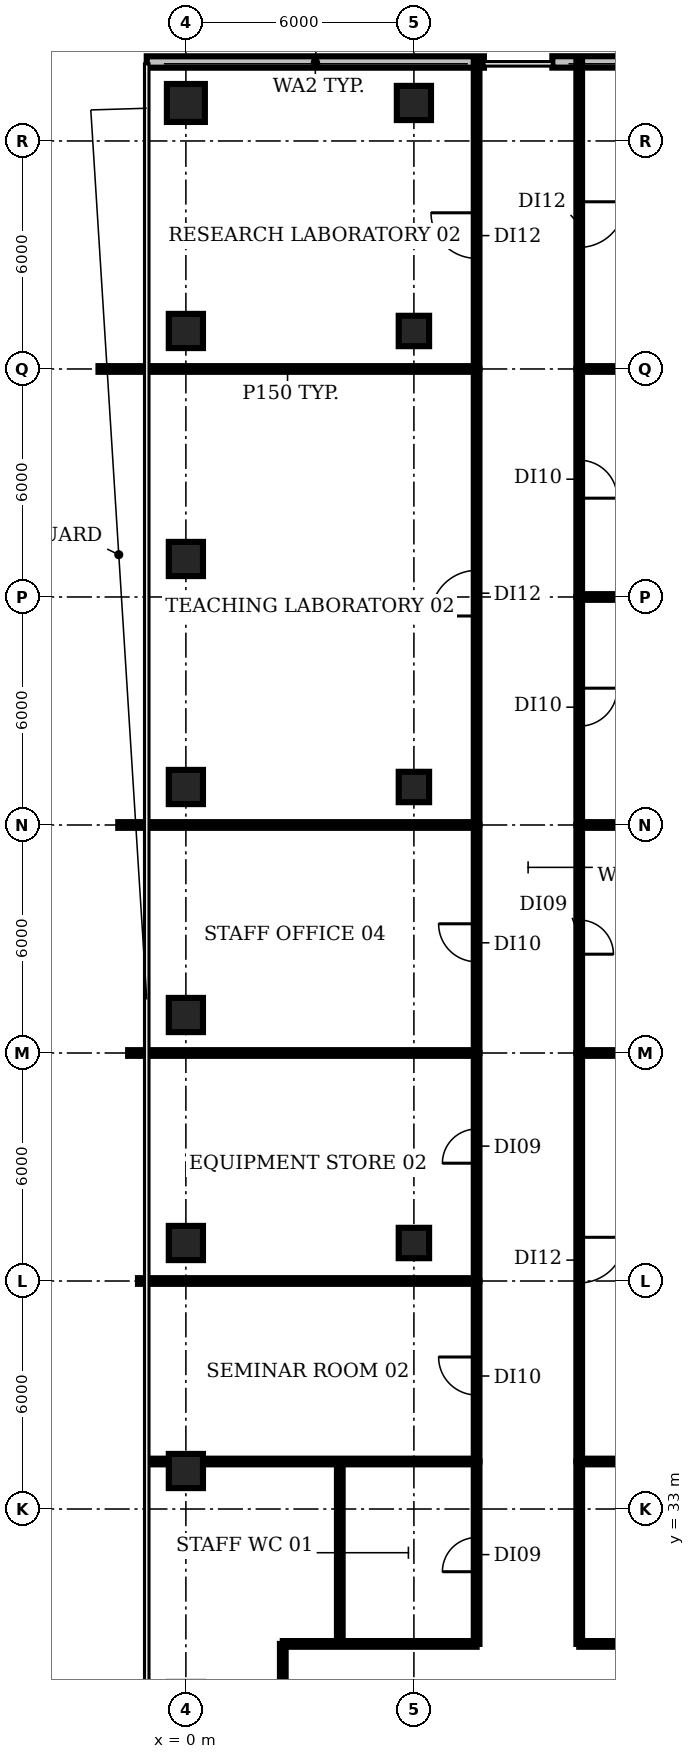
"""IFC4 building model, lengths in metres.
Left out: names, types, materials, properties, quantities, classifications, styles, units other than length and angle.
Written with IfcOpenShell. Run it as: python <this file> out.ifc"""

import sys

from ifc_helpers import new_model, si_unit, direction, frame, frame_2d, origin, origin_2d, place, context, subcontext, project, spatial, rectangle, circle, extrude, element, fill, save


model = new_model("IFC4")
c1 = context("Model", 3, precision=1e-05, world=origin(), true_north=direction((0.0, 1.0)))
c2 = subcontext(c1, "Body", "Model", "MODEL_VIEW")
j1 = project(units=[si_unit("LENGTHUNIT", "METRE"), si_unit("PLANEANGLEUNIT", "RADIAN")], contexts=[c1])
p1 = place(None, origin())
s1 = spatial("IfcSite", under=j1, at=p1, CompositionType="ELEMENT")
p2 = place(p1, origin())
s2 = spatial("IfcBuilding", under=s1, at=p2, CompositionType="ELEMENT")
p3 = place(p2, frame((0.0, 0.0, 100.4)))
s3 = spatial("IfcBuildingStorey", under=s2, at=p3, CompositionType="ELEMENT", Elevation=100.4)
for number, where, z_axis, x_axis in (
    (1, (0.0, 34.0, 0.0), (0.0, 0.0, 1.0), (1.0, 0.0, 0.0)),
    (2, (0.0, 40.0, 0.0), (0.0, 0.0, 1.0), (1.0, 0.0, 0.0)),
    (3, (0.0, 46.0, 0.0), (0.0, 0.0, 1.0), (1.0, 0.0, 0.0)),
    (4, (0.0, 52.0, 0.0), (0.0, 0.0, 1.0), (1.0, 0.0, 0.0)),
    (5, (0.0, 58.0, 0.0), (0.0, 0.0, 1.0), (1.0, 0.0, 0.0)),
    (6, (0.0, 64.0, 0.0), (0.0, 0.0, 1.0), (1.0, 0.0, 0.0)),
):
    element("IfcColumn", number, at=place(p3, frame(where, z_axis=z_axis, x_axis=x_axis)), inside=s3, PredefinedType="COLUMN", context=c2, shape_type="SweptSolid", body=[
        extrude(rectangle(XDim=0.9, YDim=0.9, at=origin_2d()), origin(), (0.0, 0.0, 1.0), 3.85),
    ])
p4 = place(p3, frame((0.0, 70.0, 0.0), z_axis=(0.0, 0.0, 1.0), x_axis=(1.0, 0.0, 0.0)))
e7 = element("IfcColumn", 7, at=p4, inside=s3, PredefinedType="COLUMN", context=c2, shape_type="SweptSolid", body=[
    extrude(circle(Radius=0.5, at=origin_2d()), origin(), (0.0, 0.0, 1.0), 3.85),
])
for number, where, z_axis, x_axis in (
    (8, (6.0, 40.0, 0.0), (0.0, 0.0, 1.0), (1.0, 0.0, 0.0)),
    (9, (6.0, 52.0, 0.0), (0.0, 0.0, 1.0), (1.0, 0.0, 0.0)),
    (10, (6.0, 64.0, 0.0), (0.0, 0.0, 1.0), (1.0, 0.0, 0.0)),
):
    element("IfcColumn", number, at=place(p3, frame(where, z_axis=z_axis, x_axis=x_axis)), inside=s3, PredefinedType="COLUMN", context=c2, shape_type="SweptSolid", body=[
        extrude(rectangle(XDim=0.8, YDim=0.8, at=origin_2d()), origin(), (0.0, 0.0, 1.0), 3.85),
    ])
p5 = place(p3, frame((6.0, 70.0, 0.0), z_axis=(0.0, 0.0, 1.0), x_axis=(1.0, 0.0, 0.0)))
e11 = element("IfcColumn", 11, at=p5, inside=s3, PredefinedType="COLUMN", context=c2, shape_type="SweptSolid", body=[
    extrude(rectangle(XDim=0.9, YDim=0.9, at=origin_2d()), origin(), (0.0, 0.0, 1.0), 3.85),
])
p6 = place(p3, frame((14.357, 71.08, 0.0), z_axis=(0.0, 0.0, 1.0), x_axis=(-1.0, 0.0, 0.0)))
e12 = element("IfcWall", 12, at=p6, inside=s3, PredefinedType="SOLIDWALL", context=c2, shape_type="SweptSolid", body=[
    extrude(rectangle(XDim=4.715, YDim=0.3, at=frame_2d((2.357, 0.0))), origin(), (0.0, 0.0, 1.0), 3.85),
])
p7 = place(p3, frame((7.843, 71.078, 0.0), z_axis=(0.0, 0.0, 1.0), x_axis=(-1.0, 0.0, 0.0)))
e13 = element("IfcWall", 13, at=p7, inside=s3, PredefinedType="SOLIDWALL", context=c2, shape_type="SweptSolid", body=[
    extrude(rectangle(XDim=8.873, YDim=0.3, at=frame_2d((4.436, 0.0))), origin(), (0.0, 0.0, 1.0), 3.85),
])
p8 = place(p3, frame((-2.3, 63.0, 0.0), z_axis=(0.0, 0.0, 1.0), x_axis=(1.0, 0.0, 0.0)))
e14 = element("IfcWall", 14, at=p8, inside=s3, PredefinedType="PARTITIONING", context=c2, shape_type="SweptSolid", body=[
    extrude(rectangle(XDim=9.95, YDim=0.15, at=frame_2d((4.975, 0.0))), origin(), (0.0, 0.0, 1.0), 2.83),
])
p9 = place(p3, frame((-1.78, 51.0, 0.0), z_axis=(0.0, 0.0, 1.0), x_axis=(1.0, 0.0, 0.0)))
e15 = element("IfcWall", 15, at=p9, inside=s3, PredefinedType="PARTITIONING", context=c2, shape_type="SweptSolid", body=[
    extrude(rectangle(XDim=9.43, YDim=0.15, at=frame_2d((4.715, 0.0))), origin(), (0.0, 0.0, 1.0), 2.83),
])
p10 = place(p3, frame((-1.52, 45.0, 0.0), z_axis=(0.0, 0.0, 1.0), x_axis=(1.0, 0.0, 0.0)))
e16 = element("IfcWall", 16, at=p10, inside=s3, PredefinedType="PARTITIONING", context=c2, shape_type="SweptSolid", body=[
    extrude(rectangle(XDim=9.17, YDim=0.15, at=frame_2d((4.585, 0.0))), origin(), (0.0, 0.0, 1.0), 2.83),
])
p11 = place(p3, frame((-1.26, 39.0, 0.0), z_axis=(0.0, 0.0, 1.0), x_axis=(1.0, 0.0, 0.0)))
e17 = element("IfcWall", 17, at=p11, inside=s3, PredefinedType="PARTITIONING", context=c2, shape_type="SweptSolid", body=[
    extrude(rectangle(XDim=8.91, YDim=0.15, at=frame_2d((4.455, 0.0))), origin(), (0.0, 0.0, 1.0), 2.83),
])
p12 = place(p3, frame((-0.965, 34.25, 0.0), z_axis=(0.0, 0.0, 1.0), x_axis=(1.0, 0.0, 0.0)))
e18 = element("IfcWall", 18, at=p12, inside=s3, PredefinedType="PARTITIONING", context=c2, shape_type="SweptSolid", body=[
    extrude(rectangle(XDim=8.615, YDim=0.15, at=frame_2d((4.308, 0.0))), origin(), (0.0, 0.0, 1.0), 2.83),
])
p13 = place(p3, frame((2.55, 25.55, 0.0), z_axis=(0.0, 0.0, 1.0), x_axis=(0.0, 1.0, 0.0)))
e19 = element("IfcWall", 19, at=p13, inside=s3, PredefinedType="PARTITIONING", context=c2, shape_type="SweptSolid", body=[
    extrude(rectangle(XDim=3.9, YDim=0.15, at=frame_2d((1.95, 0.0))), origin(), (0.0, 0.0, 1.0), 2.83),
])
p14 = place(p3, frame((2.55, 29.45, 0.0), z_axis=(0.0, 0.0, 1.0), x_axis=(1.0, 0.0, 0.0)))
e20 = element("IfcWall", 20, at=p14, inside=s3, PredefinedType="PARTITIONING", context=c2, shape_type="SweptSolid", body=[
    extrude(rectangle(XDim=5.1, YDim=0.15, at=frame_2d((2.55, 0.0))), origin(), (0.0, 0.0, 1.0), 2.83),
])
p15 = place(p3, frame((4.05, 29.45, 0.0), z_axis=(0.0, 0.0, 1.0), x_axis=(0.0, 1.0, 0.0)))
e21 = element("IfcWall", 21, at=p15, inside=s3, PredefinedType="PARTITIONING", context=c2, shape_type="SweptSolid", body=[
    extrude(rectangle(XDim=4.8, YDim=0.15, at=frame_2d((2.4, 0.0))), origin(), (0.0, 0.0, 1.0), 2.83),
])
p16 = place(p3, frame((7.65, 29.45, 0.0), z_axis=(0.0, 0.0, 1.0), x_axis=(0.0, 1.0, 0.0)))
e22 = element("IfcWall", 22, at=p16, inside=s3, PredefinedType="PARTITIONING", context=c2, shape_type="SweptSolid", body=[
    extrude(rectangle(XDim=4.8, YDim=0.15, at=frame_2d((2.4, 0.0))), origin(), (0.0, 0.0, 1.0), 2.83),
])
p17 = place(p16, frame((1.9, 0.0, 0.0)))
e23 = element("IfcOpeningElement", 23, at=p17, cuts=e22, PredefinedType="OPENING", context=c2, shape_type="SweptSolid", body=[
    extrude(rectangle(XDim=0.9, YDim=2.1, at=frame_2d((0.45, 1.05))), frame((0.0, 0.085, 0.0), z_axis=(0.0, -1.0, 0.0), x_axis=(1.0, 0.0, 0.0)), (0.0, 0.0, 1.0), 0.17),
])
p18 = place(p3, frame((7.65, 34.25, 0.0), z_axis=(0.0, 0.0, 1.0), x_axis=(0.0, 1.0, 0.0)))
e24 = element("IfcWall", 24, at=p18, inside=s3, PredefinedType="PARTITIONING", context=c2, shape_type="SweptSolid", body=[
    extrude(rectangle(XDim=4.75, YDim=0.15, at=frame_2d((2.375, 0.0))), origin(), (0.0, 0.0, 1.0), 2.83),
])
p19 = place(p18, frame((1.75, 0.0, 0.0)))
e25 = element("IfcOpeningElement", 25, at=p19, cuts=e24, PredefinedType="OPENING", context=c2, shape_type="SweptSolid", body=[
    extrude(rectangle(XDim=1.0, YDim=2.1, at=frame_2d((0.5, 1.05))), frame((0.0, 0.085, 0.0), z_axis=(0.0, -1.0, 0.0), x_axis=(1.0, 0.0, 0.0)), (0.0, 0.0, 1.0), 0.17),
])
p20 = place(p3, frame((7.65, 39.0, 0.0), z_axis=(0.0, 0.0, 1.0), x_axis=(0.0, 1.0, 0.0)))
e26 = element("IfcWall", 26, at=p20, inside=s3, PredefinedType="PARTITIONING", context=c2, shape_type="SweptSolid", body=[
    extrude(rectangle(XDim=6.0, YDim=0.15, at=frame_2d((3.0, 0.0))), origin(), (0.0, 0.0, 1.0), 2.83),
])
p21 = place(p20, frame((3.1, 0.0, 0.0)))
e27 = element("IfcOpeningElement", 27, at=p21, cuts=e26, PredefinedType="OPENING", context=c2, shape_type="SweptSolid", body=[
    extrude(rectangle(XDim=0.9, YDim=2.1, at=frame_2d((0.45, 1.05))), frame((0.0, 0.085, 0.0), z_axis=(0.0, -1.0, 0.0), x_axis=(1.0, 0.0, 0.0)), (0.0, 0.0, 1.0), 0.17),
])
p22 = place(p3, frame((7.65, 45.0, 0.0), z_axis=(0.0, 0.0, 1.0), x_axis=(0.0, 1.0, 0.0)))
e28 = element("IfcWall", 28, at=p22, inside=s3, PredefinedType="PARTITIONING", context=c2, shape_type="SweptSolid", body=[
    extrude(rectangle(XDim=6.0, YDim=0.15, at=frame_2d((3.0, 0.0))), origin(), (0.0, 0.0, 1.0), 2.83),
])
p23 = place(p22, frame((2.4, 0.0, 0.0)))
e29 = element("IfcOpeningElement", 29, at=p23, cuts=e28, PredefinedType="OPENING", context=c2, shape_type="SweptSolid", body=[
    extrude(rectangle(XDim=1.0, YDim=2.1, at=frame_2d((0.5, 1.05))), frame((0.0, 0.085, 0.0), z_axis=(0.0, -1.0, 0.0), x_axis=(1.0, 0.0, 0.0)), (0.0, 0.0, 1.0), 0.17),
])
p24 = place(p3, frame((7.65, 51.0, 0.0), z_axis=(0.0, 0.0, 1.0), x_axis=(0.0, 1.0, 0.0)))
e30 = element("IfcWall", 30, at=p24, inside=s3, PredefinedType="PARTITIONING", context=c2, shape_type="SweptSolid", body=[
    extrude(rectangle(XDim=12.0, YDim=0.15, at=frame_2d((6.0, 0.0))), origin(), (0.0, 0.0, 1.0), 2.83),
])
p25 = place(p24, frame((5.5, 0.0, 0.0)))
e31 = element("IfcOpeningElement", 31, at=p25, cuts=e30, PredefinedType="OPENING", context=c2, shape_type="SweptSolid", body=[
    extrude(rectangle(XDim=1.2, YDim=2.1, at=frame_2d((0.6, 1.05))), frame((0.0, 0.085, 0.0), z_axis=(0.0, -1.0, 0.0), x_axis=(1.0, 0.0, 0.0)), (0.0, 0.0, 1.0), 0.17),
])
p26 = place(p3, frame((7.65, 63.0, 0.0), z_axis=(0.0, 0.0, 1.0), x_axis=(0.0, 1.0, 0.0)))
e32 = element("IfcWall", 32, at=p26, inside=s3, PredefinedType="PARTITIONING", context=c2, shape_type="SweptSolid", body=[
    extrude(rectangle(XDim=8.09, YDim=0.15, at=frame_2d((4.045, 0.0))), origin(), (0.0, 0.0, 1.0), 2.83),
])
p27 = place(p26, frame((2.91, 0.0, 0.0)))
e33 = element("IfcOpeningElement", 33, at=p27, cuts=e32, PredefinedType="OPENING", context=c2, shape_type="SweptSolid", body=[
    extrude(rectangle(XDim=1.2, YDim=2.1, at=frame_2d((0.6, 1.05))), frame((0.0, 0.085, 0.0), z_axis=(0.0, -1.0, 0.0), x_axis=(1.0, 0.0, 0.0)), (0.0, 0.0, 1.0), 0.17),
])
p28 = place(p3, frame((10.35, 29.45, 0.0), z_axis=(0.0, 0.0, 1.0), x_axis=(0.0, 1.0, 0.0)))
e34 = element("IfcWall", 34, at=p28, inside=s3, PredefinedType="PARTITIONING", context=c2, shape_type="SweptSolid", body=[
    extrude(rectangle(XDim=4.8, YDim=0.15, at=frame_2d((2.4, 0.0))), origin(), (0.0, 0.0, 1.0), 2.83),
])
p29 = place(p3, frame((10.35, 29.45, 0.0), z_axis=(0.0, 0.0, 1.0), x_axis=(1.0, 0.0, 0.0)))
e35 = element("IfcWall", 35, at=p29, inside=s3, PredefinedType="PARTITIONING", context=c2, shape_type="SweptSolid", body=[
    extrude(rectangle(XDim=4.05, YDim=0.15, at=frame_2d((2.025, 0.0))), origin(), (0.0, 0.0, 1.0), 2.83),
])
p30 = place(p3, frame((10.35, 34.25, 0.0), z_axis=(0.0, 0.0, 1.0), x_axis=(1.0, 0.0, 0.0)))
e36 = element("IfcWall", 36, at=p30, inside=s3, PredefinedType="PARTITIONING", context=c2, shape_type="SweptSolid", body=[
    extrude(rectangle(XDim=14.85, YDim=0.15, at=frame_2d((7.425, 0.0))), origin(), (0.0, 0.0, 1.0), 2.83),
])
p31 = place(p3, frame((10.35, 45.0, 0.0), z_axis=(0.0, 0.0, 1.0), x_axis=(0.0, -1.0, 0.0)))
e37 = element("IfcWall", 37, at=p31, inside=s3, PredefinedType="PARTITIONING", context=c2, shape_type="SweptSolid", body=[
    extrude(rectangle(XDim=10.75, YDim=0.15, at=frame_2d((5.375, 0.0))), origin(), (0.0, 0.0, 1.0), 2.83),
])
p32 = place(p31, frame((4.85, 0.0, 0.0)))
e38 = element("IfcOpeningElement", 38, at=p32, cuts=e37, PredefinedType="OPENING", context=c2, shape_type="SweptSolid", body=[
    extrude(rectangle(XDim=1.2, YDim=2.1, at=frame_2d((0.6, 1.05))), frame((0.0, 0.085, 0.0), z_axis=(0.0, -1.0, 0.0), x_axis=(1.0, 0.0, 0.0)), (0.0, 0.0, 1.0), 0.17),
])
p33 = place(p3, frame((10.35, 45.0, 0.0), z_axis=(0.0, 0.0, 1.0), x_axis=(1.0, 0.0, 0.0)))
e39 = element("IfcWall", 39, at=p33, inside=s3, PredefinedType="PARTITIONING", context=c2, shape_type="SweptSolid", body=[
    extrude(rectangle(XDim=14.63, YDim=0.15, at=frame_2d((7.315, 0.0))), origin(), (0.0, 0.0, 1.0), 2.83),
])
p34 = place(p3, frame((10.35, 51.0, 0.0), z_axis=(0.0, 0.0, 1.0), x_axis=(0.0, -1.0, 0.0)))
e40 = element("IfcWall", 40, at=p34, inside=s3, PredefinedType="PARTITIONING", context=c2, shape_type="SweptSolid", body=[
    extrude(rectangle(XDim=6.0, YDim=0.15, at=frame_2d((3.0, 0.0))), origin(), (0.0, 0.0, 1.0), 2.83),
])
p35 = place(p34, frame((2.5, 0.0, 0.0)))
e41 = element("IfcOpeningElement", 41, at=p35, cuts=e40, PredefinedType="OPENING", context=c2, shape_type="SweptSolid", body=[
    extrude(rectangle(XDim=0.9, YDim=2.1, at=frame_2d((0.45, 1.05))), frame((0.0, 0.085, 0.0), z_axis=(0.0, -1.0, 0.0), x_axis=(1.0, 0.0, 0.0)), (0.0, 0.0, 1.0), 0.17),
])
p36 = place(p3, frame((10.35, 51.0, 0.0), z_axis=(0.0, 0.0, 1.0), x_axis=(1.0, 0.0, 0.0)))
e42 = element("IfcWall", 42, at=p36, inside=s3, PredefinedType="PARTITIONING", context=c2, shape_type="SweptSolid", body=[
    extrude(rectangle(XDim=14.63, YDim=0.15, at=frame_2d((7.315, 0.0))), origin(), (0.0, 0.0, 1.0), 2.83),
])
p37 = place(p3, frame((10.35, 57.0, 0.0), z_axis=(0.0, 0.0, 1.0), x_axis=(0.0, -1.0, 0.0)))
e43 = element("IfcWall", 43, at=p37, inside=s3, PredefinedType="PARTITIONING", context=c2, shape_type="SweptSolid", body=[
    extrude(rectangle(XDim=6.0, YDim=0.15, at=frame_2d((3.0, 0.0))), origin(), (0.0, 0.0, 1.0), 2.83),
])
p38 = place(p37, frame((2.4, 0.0, 0.0)))
e44 = element("IfcOpeningElement", 44, at=p38, cuts=e43, PredefinedType="OPENING", context=c2, shape_type="SweptSolid", body=[
    extrude(rectangle(XDim=1.0, YDim=2.1, at=frame_2d((0.5, 1.05))), frame((0.0, 0.085, 0.0), z_axis=(0.0, -1.0, 0.0), x_axis=(1.0, 0.0, 0.0)), (0.0, 0.0, 1.0), 0.17),
])
p39 = place(p3, frame((10.35, 57.0, 0.0), z_axis=(0.0, 0.0, 1.0), x_axis=(1.0, 0.0, 0.0)))
e45 = element("IfcWall", 45, at=p39, inside=s3, PredefinedType="PARTITIONING", context=c2, shape_type="SweptSolid", body=[
    extrude(rectangle(XDim=14.63, YDim=0.15, at=frame_2d((7.315, 0.0))), origin(), (0.0, 0.0, 1.0), 2.83),
])
p40 = place(p3, frame((10.35, 63.0, 0.0), z_axis=(0.0, 0.0, 1.0), x_axis=(0.0, -1.0, 0.0)))
e46 = element("IfcWall", 46, at=p40, inside=s3, PredefinedType="PARTITIONING", context=c2, shape_type="SweptSolid", body=[
    extrude(rectangle(XDim=6.0, YDim=0.15, at=frame_2d((3.0, 0.0))), origin(), (0.0, 0.0, 1.0), 2.83),
])
p41 = place(p40, frame((2.4, 0.0, 0.0)))
e47 = element("IfcOpeningElement", 47, at=p41, cuts=e46, PredefinedType="OPENING", context=c2, shape_type="SweptSolid", body=[
    extrude(rectangle(XDim=1.0, YDim=2.1, at=frame_2d((0.5, 1.05))), frame((0.0, 0.085, 0.0), z_axis=(0.0, -1.0, 0.0), x_axis=(1.0, 0.0, 0.0)), (0.0, 0.0, 1.0), 0.17),
])
p42 = place(p3, frame((10.35, 63.0, 0.0), z_axis=(0.0, 0.0, 1.0), x_axis=(1.0, 0.0, 0.0)))
e48 = element("IfcWall", 48, at=p42, inside=s3, PredefinedType="PARTITIONING", context=c2, shape_type="SweptSolid", body=[
    extrude(rectangle(XDim=14.63, YDim=0.15, at=frame_2d((7.315, 0.0))), origin(), (0.0, 0.0, 1.0), 2.83),
])
p43 = place(p3, frame((10.35, 71.09, 0.0), z_axis=(0.0, 0.0, 1.0), x_axis=(0.0, -1.0, 0.0)))
e49 = element("IfcWall", 49, at=p43, inside=s3, PredefinedType="PARTITIONING", context=c2, shape_type="SweptSolid", body=[
    extrude(rectangle(XDim=8.09, YDim=0.15, at=frame_2d((4.045, 0.0))), origin(), (0.0, 0.0, 1.0), 2.83),
])
p44 = place(p43, frame((3.69, 0.0, 0.0)))
e50 = element("IfcOpeningElement", 50, at=p44, cuts=e49, PredefinedType="OPENING", context=c2, shape_type="SweptSolid", body=[
    extrude(rectangle(XDim=1.2, YDim=2.1, at=frame_2d((0.6, 1.05))), frame((0.0, 0.085, 0.0), z_axis=(0.0, -1.0, 0.0), x_axis=(1.0, 0.0, 0.0)), (0.0, 0.0, 1.0), 0.17),
])
p45 = place(p17, origin())
e51 = element("IfcDoor", 51, at=p45, inside=s3, OperationType="SINGLE_SWING_LEFT", PredefinedType="DOOR", context=c2, shape_type="SweptSolid", body=[
    extrude(rectangle(XDim=0.9, YDim=2.1, at=frame_2d((0.45, 1.05))), frame((0.0, 0.025, 0.0), z_axis=(0.0, -1.0, 0.0), x_axis=(1.0, 0.0, 0.0)), (0.0, 0.0, 1.0), 0.05),
])
fill(e23, e51)
p46 = place(p19, origin())
e52 = element("IfcDoor", 52, at=p46, inside=s3, OperationType="SINGLE_SWING_RIGHT", PredefinedType="DOOR", context=c2, shape_type="SweptSolid", body=[
    extrude(rectangle(XDim=1.0, YDim=2.1, at=frame_2d((0.5, 1.05))), frame((0.0, 0.025, 0.0), z_axis=(0.0, -1.0, 0.0), x_axis=(1.0, 0.0, 0.0)), (0.0, 0.0, 1.0), 0.05),
])
fill(e25, e52)
p47 = place(p21, origin())
e53 = element("IfcDoor", 53, at=p47, inside=s3, OperationType="SINGLE_SWING_LEFT", PredefinedType="DOOR", context=c2, shape_type="SweptSolid", body=[
    extrude(rectangle(XDim=0.9, YDim=2.1, at=frame_2d((0.45, 1.05))), frame((0.0, 0.025, 0.0), z_axis=(0.0, -1.0, 0.0), x_axis=(1.0, 0.0, 0.0)), (0.0, 0.0, 1.0), 0.05),
])
fill(e27, e53)
p48 = place(p23, origin())
e54 = element("IfcDoor", 54, at=p48, inside=s3, OperationType="SINGLE_SWING_RIGHT", PredefinedType="DOOR", context=c2, shape_type="SweptSolid", body=[
    extrude(rectangle(XDim=1.0, YDim=2.1, at=frame_2d((0.5, 1.05))), frame((0.0, 0.025, 0.0), z_axis=(0.0, -1.0, 0.0), x_axis=(1.0, 0.0, 0.0)), (0.0, 0.0, 1.0), 0.05),
])
fill(e29, e54)
p49 = place(p25, origin())
e55 = element("IfcDoor", 55, at=p49, inside=s3, OperationType="SINGLE_SWING_LEFT", PredefinedType="DOOR", context=c2, shape_type="SweptSolid", body=[
    extrude(rectangle(XDim=1.2, YDim=2.1, at=frame_2d((0.6, 1.05))), frame((0.0, 0.025, 0.0), z_axis=(0.0, -1.0, 0.0), x_axis=(1.0, 0.0, 0.0)), (0.0, 0.0, 1.0), 0.05),
])
fill(e31, e55)
p50 = place(p27, origin())
e56 = element("IfcDoor", 56, at=p50, inside=s3, OperationType="SINGLE_SWING_RIGHT", PredefinedType="DOOR", context=c2, shape_type="SweptSolid", body=[
    extrude(rectangle(XDim=1.2, YDim=2.1, at=frame_2d((0.6, 1.05))), frame((0.0, 0.025, 0.0), z_axis=(0.0, -1.0, 0.0), x_axis=(1.0, 0.0, 0.0)), (0.0, 0.0, 1.0), 0.05),
])
fill(e33, e56)
p51 = place(p32, origin())
e57 = element("IfcDoor", 57, at=p51, inside=s3, OperationType="SINGLE_SWING_LEFT", PredefinedType="DOOR", context=c2, shape_type="SweptSolid", body=[
    extrude(rectangle(XDim=1.2, YDim=2.1, at=frame_2d((0.6, 1.05))), frame((0.0, 0.025, 0.0), z_axis=(0.0, -1.0, 0.0), x_axis=(1.0, 0.0, 0.0)), (0.0, 0.0, 1.0), 0.05),
])
fill(e38, e57)
p52 = place(p35, origin())
e58 = element("IfcDoor", 58, at=p52, inside=s3, OperationType="SINGLE_SWING_RIGHT", PredefinedType="DOOR", context=c2, shape_type="SweptSolid", body=[
    extrude(rectangle(XDim=0.9, YDim=2.1, at=frame_2d((0.45, 1.05))), frame((0.0, 0.025, 0.0), z_axis=(0.0, -1.0, 0.0), x_axis=(1.0, 0.0, 0.0)), (0.0, 0.0, 1.0), 0.05),
])
fill(e41, e58)
p53 = place(p38, origin())
e59 = element("IfcDoor", 59, at=p53, inside=s3, OperationType="SINGLE_SWING_LEFT", PredefinedType="DOOR", context=c2, shape_type="SweptSolid", body=[
    extrude(rectangle(XDim=1.0, YDim=2.1, at=frame_2d((0.5, 1.05))), frame((0.0, 0.025, 0.0), z_axis=(0.0, -1.0, 0.0), x_axis=(1.0, 0.0, 0.0)), (0.0, 0.0, 1.0), 0.05),
])
fill(e44, e59)
p54 = place(p41, origin())
e60 = element("IfcDoor", 60, at=p54, inside=s3, OperationType="SINGLE_SWING_RIGHT", PredefinedType="DOOR", context=c2, shape_type="SweptSolid", body=[
    extrude(rectangle(XDim=1.0, YDim=2.1, at=frame_2d((0.5, 1.05))), frame((0.0, 0.025, 0.0), z_axis=(0.0, -1.0, 0.0), x_axis=(1.0, 0.0, 0.0)), (0.0, 0.0, 1.0), 0.05),
])
fill(e47, e60)
p55 = place(p44, origin())
e61 = element("IfcDoor", 61, at=p55, inside=s3, OperationType="SINGLE_SWING_LEFT", PredefinedType="DOOR", context=c2, shape_type="SweptSolid", body=[
    extrude(rectangle(XDim=1.2, YDim=2.1, at=frame_2d((0.6, 1.05))), frame((0.0, 0.025, 0.0), z_axis=(0.0, -1.0, 0.0), x_axis=(1.0, 0.0, 0.0)), (0.0, 0.0, 1.0), 0.05),
])
fill(e50, e61)
save(model, sys.argv[1])
